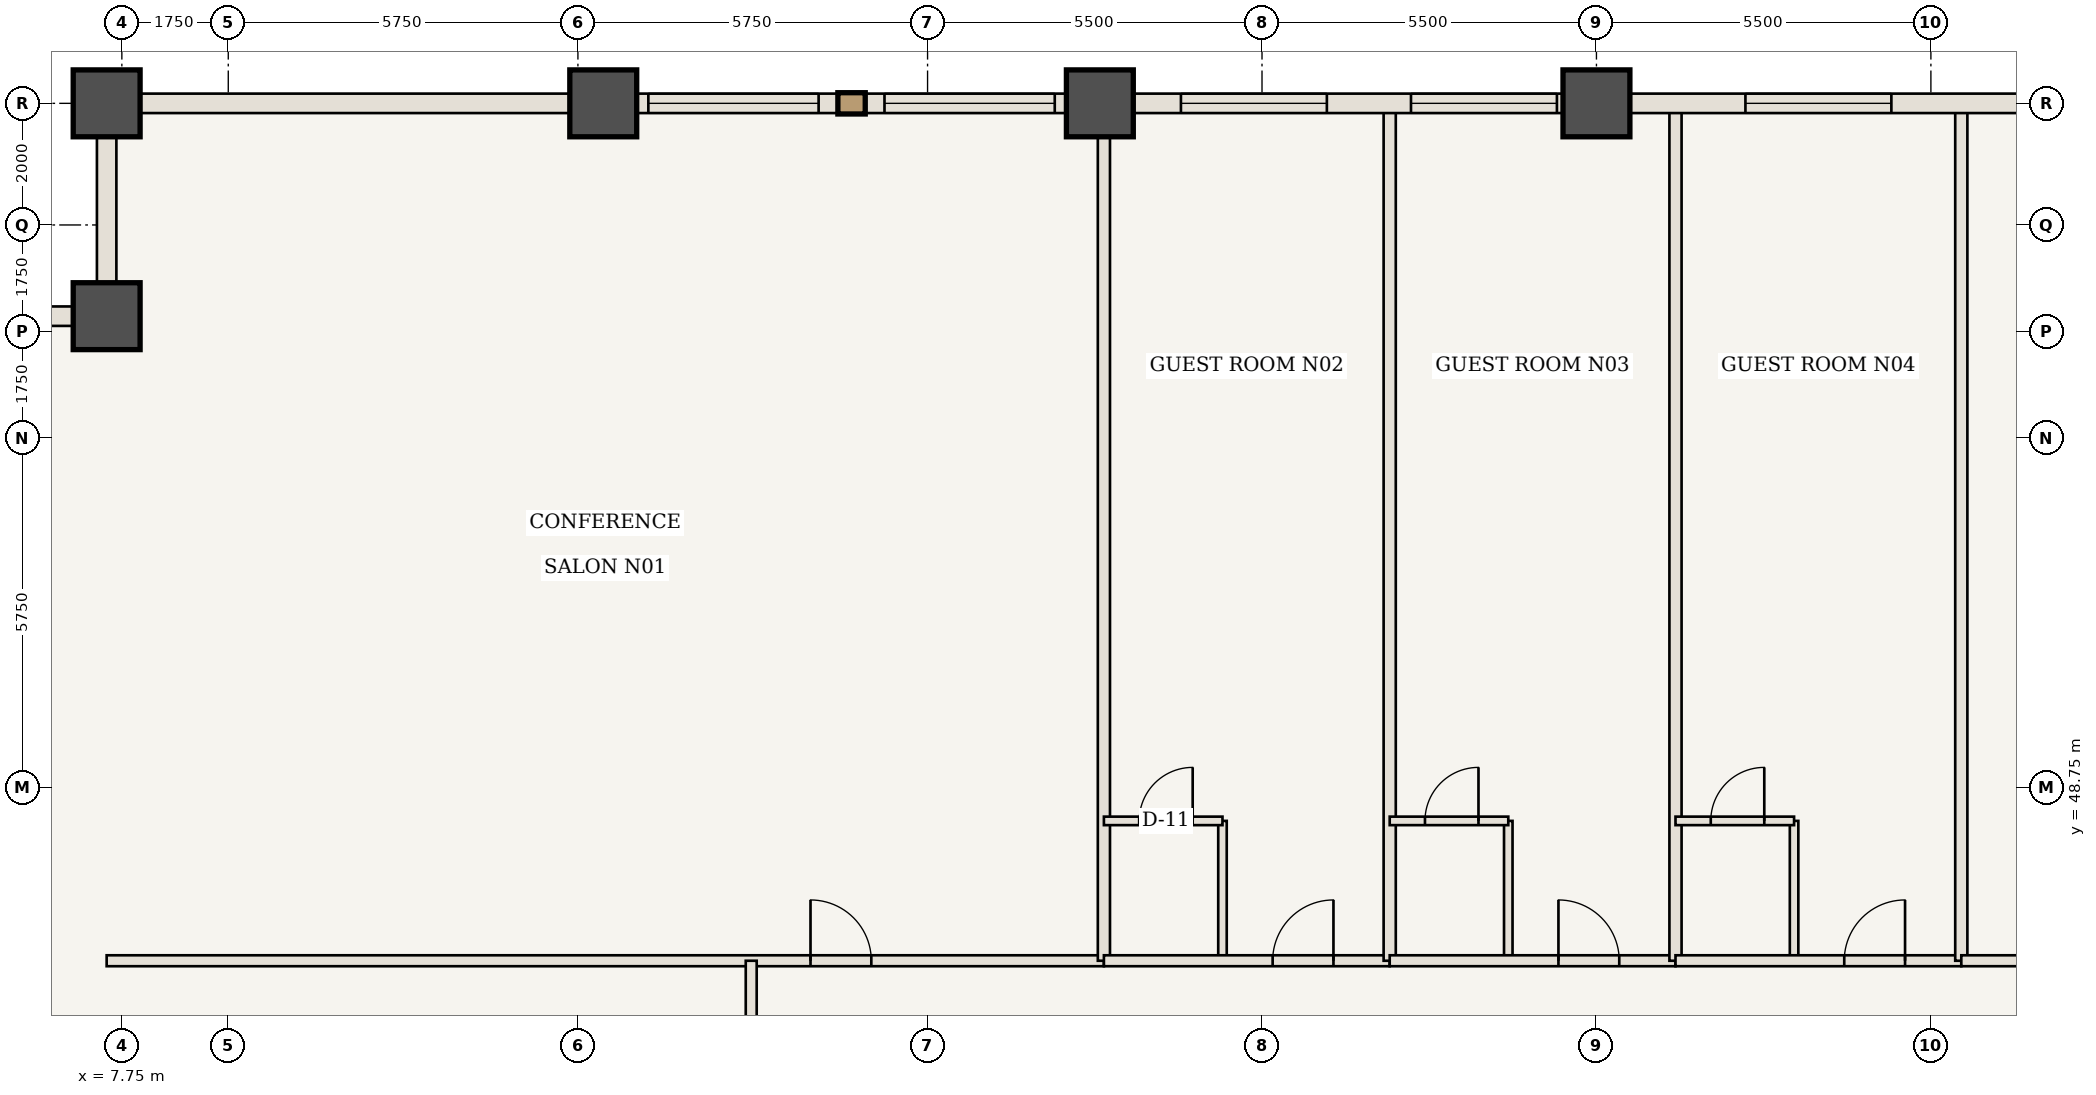
"""IFC4 building model, lengths in metres.
Left out: names, types, materials, properties, quantities, classifications, styles, units other than length and angle.
Written with IfcOpenShell. Run it as: python <this file> out.ifc"""

import sys

from ifc_helpers import new_model, si_unit, direction, frame, frame_2d, origin, origin_2d, place, context, subcontext, project, spatial, rectangle, extrude, element, fill, save


model = new_model("IFC4")
c1 = context("Model", 3, precision=1e-05, world=origin(), true_north=direction((0.0, 1.0)))
c2 = subcontext(c1, "Body", "Model", "MODEL_VIEW")
j1 = project(units=[si_unit("LENGTHUNIT", "METRE"), si_unit("PLANEANGLEUNIT", "RADIAN")], contexts=[c1])
p1 = place(None, origin())
s1 = spatial("IfcSite", under=j1, at=p1, CompositionType="ELEMENT")
p2 = place(p1, origin())
s2 = spatial("IfcBuilding", under=s1, at=p2, CompositionType="ELEMENT")
p3 = place(p2, frame((0.0, 0.0, 52.85)))
s3 = spatial("IfcBuildingStorey", under=s2, at=p3, CompositionType="ELEMENT", Elevation=52.85)
for number, where, z_axis, x_axis in (
    (1, (7.5, 60.0, 0.0), (0.0, 0.0, 1.0), (1.0, 0.0, 0.0)),
    (2, (7.5, 56.5, 0.0), (0.0, 0.0, 1.0), (1.0, 0.0, 0.0)),
    (3, (15.667, 60.0, 0.0), (0.0, 0.0, 1.0), (1.0, 0.0, 0.0)),
    (4, (23.833, 60.0, 0.0), (0.0, 0.0, 1.0), (1.0, 0.0, 0.0)),
    (5, (32.0, 60.0, 0.0), (0.0, 0.0, 1.0), (1.0, 0.0, 0.0)),
):
    element("IfcColumn", number, at=place(p3, frame(where, z_axis=z_axis, x_axis=x_axis)), inside=s3, PredefinedType="COLUMN", context=c2, shape_type="SweptSolid", body=[
        extrude(rectangle(XDim=1.1, YDim=1.1, at=origin_2d()), origin(), (0.0, 0.0, 1.0), 3.5),
    ])
p4 = place(p3, frame((7.5, 45.9, 0.0), z_axis=(0.0, 0.0, 1.0), x_axis=(1.0, 0.0, 0.0)))
e6 = element("IfcWall", 6, at=p4, inside=s3, PredefinedType="STANDARD", context=c2, shape_type="SweptSolid", body=[
    extrude(rectangle(XDim=16.4, YDim=0.18, at=frame_2d((8.2, 0.0))), origin(), (0.0, 0.0, 1.0), 3.32),
])
p5 = place(p4, frame((11.575, 0.0, 0.0)))
e7 = element("IfcOpeningElement", 7, at=p5, cuts=e6, PredefinedType="OPENING", context=c2, shape_type="SweptSolid", body=[
    extrude(rectangle(XDim=1.0, YDim=2.15, at=frame_2d((0.5, 1.075))), frame((0.0, 0.1, 0.0), z_axis=(0.0, -1.0, 0.0), x_axis=(1.0, 0.0, 0.0)), (0.0, 0.0, 1.0), 0.2),
])
p6 = place(p3, frame((23.9, 45.9, 0.0), z_axis=(0.0, 0.0, 1.0), x_axis=(0.0, 1.0, 0.0)))
e8 = element("IfcWall", 8, at=p6, inside=s3, PredefinedType="STANDARD", context=c2, shape_type="SweptSolid", body=[
    extrude(rectangle(XDim=14.04, YDim=0.2, at=frame_2d((7.02, 0.0))), origin(), (0.0, 0.0, 1.0), 3.32),
])
p7 = place(p3, frame((25.85, 45.9, 0.0), z_axis=(0.0, 0.0, 1.0), x_axis=(0.0, 1.0, 0.0)))
e9 = element("IfcWall", 9, at=p7, inside=s3, PredefinedType="STANDARD", context=c2, shape_type="SweptSolid", body=[
    extrude(rectangle(XDim=2.3, YDim=0.14, at=frame_2d((1.15, 0.0))), origin(), (0.0, 0.0, 1.0), 3.32),
])
p8 = place(p3, frame((23.9, 48.2, 0.0), z_axis=(0.0, 0.0, 1.0), x_axis=(1.0, 0.0, 0.0)))
e10 = element("IfcWall", 10, at=p8, inside=s3, PredefinedType="STANDARD", context=c2, shape_type="SweptSolid", body=[
    extrude(rectangle(XDim=1.95, YDim=0.14, at=frame_2d((0.975, 0.0))), origin(), (0.0, 0.0, 1.0), 3.32),
])
p9 = place(p8, frame((0.58, 0.0, 0.0)))
e11 = element("IfcOpeningElement", 11, at=p9, cuts=e10, PredefinedType="OPENING", context=c2, shape_type="SweptSolid", body=[
    extrude(rectangle(XDim=0.88, YDim=2.1, at=frame_2d((0.44, 1.05))), frame((0.0, 0.08, 0.0), z_axis=(0.0, -1.0, 0.0), x_axis=(1.0, 0.0, 0.0)), (0.0, 0.0, 1.0), 0.16),
])
p10 = place(p3, frame((23.9, 45.9, 0.0), z_axis=(0.0, 0.0, 1.0), x_axis=(1.0, 0.0, 0.0)))
e12 = element("IfcWall", 12, at=p10, inside=s3, PredefinedType="STANDARD", context=c2, shape_type="SweptSolid", body=[
    extrude(rectangle(XDim=4.7, YDim=0.18, at=frame_2d((2.35, 0.0))), origin(), (0.0, 0.0, 1.0), 3.32),
])
p11 = place(p10, frame((2.775, 0.0, 0.0)))
e13 = element("IfcOpeningElement", 13, at=p11, cuts=e12, PredefinedType="OPENING", context=c2, shape_type="SweptSolid", body=[
    extrude(rectangle(XDim=1.0, YDim=2.15, at=frame_2d((0.5, 1.075))), frame((0.0, 0.1, 0.0), z_axis=(0.0, -1.0, 0.0), x_axis=(1.0, 0.0, 0.0)), (0.0, 0.0, 1.0), 0.2),
])
p12 = place(p3, frame((28.6, 45.9, 0.0), z_axis=(0.0, 0.0, 1.0), x_axis=(0.0, 1.0, 0.0)))
e14 = element("IfcWall", 14, at=p12, inside=s3, PredefinedType="STANDARD", context=c2, shape_type="SweptSolid", body=[
    extrude(rectangle(XDim=14.04, YDim=0.2, at=frame_2d((7.02, 0.0))), origin(), (0.0, 0.0, 1.0), 3.32),
])
p13 = place(p3, frame((30.55, 45.9, 0.0), z_axis=(0.0, 0.0, 1.0), x_axis=(0.0, 1.0, 0.0)))
e15 = element("IfcWall", 15, at=p13, inside=s3, PredefinedType="STANDARD", context=c2, shape_type="SweptSolid", body=[
    extrude(rectangle(XDim=2.3, YDim=0.14, at=frame_2d((1.15, 0.0))), origin(), (0.0, 0.0, 1.0), 3.32),
])
p14 = place(p3, frame((28.6, 48.2, 0.0), z_axis=(0.0, 0.0, 1.0), x_axis=(1.0, 0.0, 0.0)))
e16 = element("IfcWall", 16, at=p14, inside=s3, PredefinedType="STANDARD", context=c2, shape_type="SweptSolid", body=[
    extrude(rectangle(XDim=1.95, YDim=0.14, at=frame_2d((0.975, 0.0))), origin(), (0.0, 0.0, 1.0), 3.32),
])
p15 = place(p14, frame((0.58, 0.0, 0.0)))
e17 = element("IfcOpeningElement", 17, at=p15, cuts=e16, PredefinedType="OPENING", context=c2, shape_type="SweptSolid", body=[
    extrude(rectangle(XDim=0.88, YDim=2.1, at=frame_2d((0.44, 1.05))), frame((0.0, 0.08, 0.0), z_axis=(0.0, -1.0, 0.0), x_axis=(1.0, 0.0, 0.0)), (0.0, 0.0, 1.0), 0.16),
])
p16 = place(p3, frame((28.6, 45.9, 0.0), z_axis=(0.0, 0.0, 1.0), x_axis=(1.0, 0.0, 0.0)))
e18 = element("IfcWall", 18, at=p16, inside=s3, PredefinedType="STANDARD", context=c2, shape_type="SweptSolid", body=[
    extrude(rectangle(XDim=4.7, YDim=0.18, at=frame_2d((2.35, 0.0))), origin(), (0.0, 0.0, 1.0), 3.32),
])
p17 = place(p16, frame((2.775, 0.0, 0.0)))
e19 = element("IfcOpeningElement", 19, at=p17, cuts=e18, PredefinedType="OPENING", context=c2, shape_type="SweptSolid", body=[
    extrude(rectangle(XDim=1.0, YDim=2.15, at=frame_2d((0.5, 1.075))), frame((0.0, 0.1, 0.0), z_axis=(0.0, -1.0, 0.0), x_axis=(1.0, 0.0, 0.0)), (0.0, 0.0, 1.0), 0.2),
])
p18 = place(p3, frame((33.3, 45.9, 0.0), z_axis=(0.0, 0.0, 1.0), x_axis=(0.0, 1.0, 0.0)))
e20 = element("IfcWall", 20, at=p18, inside=s3, PredefinedType="STANDARD", context=c2, shape_type="SweptSolid", body=[
    extrude(rectangle(XDim=14.04, YDim=0.2, at=frame_2d((7.02, 0.0))), origin(), (0.0, 0.0, 1.0), 3.32),
])
p19 = place(p3, frame((35.25, 45.9, 0.0), z_axis=(0.0, 0.0, 1.0), x_axis=(0.0, 1.0, 0.0)))
e21 = element("IfcWall", 21, at=p19, inside=s3, PredefinedType="STANDARD", context=c2, shape_type="SweptSolid", body=[
    extrude(rectangle(XDim=2.3, YDim=0.14, at=frame_2d((1.15, 0.0))), origin(), (0.0, 0.0, 1.0), 3.32),
])
p20 = place(p3, frame((33.3, 48.2, 0.0), z_axis=(0.0, 0.0, 1.0), x_axis=(1.0, 0.0, 0.0)))
e22 = element("IfcWall", 22, at=p20, inside=s3, PredefinedType="STANDARD", context=c2, shape_type="SweptSolid", body=[
    extrude(rectangle(XDim=1.95, YDim=0.14, at=frame_2d((0.975, 0.0))), origin(), (0.0, 0.0, 1.0), 3.32),
])
p21 = place(p20, frame((0.58, 0.0, 0.0)))
e23 = element("IfcOpeningElement", 23, at=p21, cuts=e22, PredefinedType="OPENING", context=c2, shape_type="SweptSolid", body=[
    extrude(rectangle(XDim=0.88, YDim=2.1, at=frame_2d((0.44, 1.05))), frame((0.0, 0.08, 0.0), z_axis=(0.0, -1.0, 0.0), x_axis=(1.0, 0.0, 0.0)), (0.0, 0.0, 1.0), 0.16),
])
p22 = place(p3, frame((33.3, 45.9, 0.0), z_axis=(0.0, 0.0, 1.0), x_axis=(1.0, 0.0, 0.0)))
e24 = element("IfcWall", 24, at=p22, inside=s3, PredefinedType="STANDARD", context=c2, shape_type="SweptSolid", body=[
    extrude(rectangle(XDim=4.7, YDim=0.18, at=frame_2d((2.35, 0.0))), origin(), (0.0, 0.0, 1.0), 3.32),
])
p23 = place(p22, frame((2.775, 0.0, 0.0)))
e25 = element("IfcOpeningElement", 25, at=p23, cuts=e24, PredefinedType="OPENING", context=c2, shape_type="SweptSolid", body=[
    extrude(rectangle(XDim=1.0, YDim=2.15, at=frame_2d((0.5, 1.075))), frame((0.0, 0.1, 0.0), z_axis=(0.0, -1.0, 0.0), x_axis=(1.0, 0.0, 0.0)), (0.0, 0.0, 1.0), 0.2),
])
p24 = place(p3, frame((38.0, 45.9, 0.0), z_axis=(0.0, 0.0, 1.0), x_axis=(0.0, 1.0, 0.0)))
e26 = element("IfcWall", 26, at=p24, inside=s3, PredefinedType="STANDARD", context=c2, shape_type="SweptSolid", body=[
    extrude(rectangle(XDim=14.04, YDim=0.2, at=frame_2d((7.02, 0.0))), origin(), (0.0, 0.0, 1.0), 3.32),
])
p25 = place(p3, frame((38.0, 45.9, 0.0), z_axis=(0.0, 0.0, 1.0), x_axis=(1.0, 0.0, 0.0)))
e27 = element("IfcWall", 27, at=p25, inside=s3, PredefinedType="STANDARD", context=c2, shape_type="SweptSolid", body=[
    extrude(rectangle(XDim=18.5, YDim=0.18, at=frame_2d((9.25, 0.0))), origin(), (0.0, 0.0, 1.0), 3.32),
])
p26 = place(p25, frame((4.875, 0.0, 0.0)))
e28 = element("IfcOpeningElement", 28, at=p26, cuts=e27, PredefinedType="OPENING", context=c2, shape_type="SweptSolid", body=[
    extrude(rectangle(XDim=1.0, YDim=2.15, at=frame_2d((0.5, 1.075))), frame((0.0, 0.1, 0.0), z_axis=(0.0, -1.0, 0.0), x_axis=(1.0, 0.0, 0.0)), (0.0, 0.0, 1.0), 0.2),
])
p27 = place(p3, frame((18.1, 38.5, 0.0), z_axis=(0.0, 0.0, 1.0), x_axis=(0.0, 1.0, 0.0)))
e29 = element("IfcWall", 29, at=p27, inside=s3, PredefinedType="STANDARD", context=c2, shape_type="SweptSolid", body=[
    extrude(rectangle(XDim=7.4, YDim=0.18, at=frame_2d((3.7, 0.0))), origin(), (0.0, 0.0, 1.0), 3.32),
])
p28 = place(p27, frame((4.65, 0.0, 0.0)))
e30 = element("IfcOpeningElement", 30, at=p28, cuts=e29, PredefinedType="OPENING", context=c2, shape_type="SweptSolid", body=[
    extrude(rectangle(XDim=1.0, YDim=2.15, at=frame_2d((0.5, 1.075))), frame((0.0, 0.1, 0.0), z_axis=(0.0, -1.0, 0.0), x_axis=(1.0, 0.0, 0.0)), (0.0, 0.0, 1.0), 0.2),
])
p29 = place(p3, frame((7.5, 60.0, 0.0), z_axis=(0.0, 0.0, 1.0), x_axis=(1.0, 0.0, 0.0)))
e31 = element("IfcWall", 31, at=p29, inside=s3, PredefinedType="USERDEFINED", context=c2, shape_type="SweptSolid", body=[
    extrude(rectangle(XDim=8.167, YDim=0.32, at=frame_2d((4.083, 0.0))), origin(), (0.0, 0.0, 1.0), 2.52),
])
p30 = place(p3, frame((15.667, 60.0, 0.0), z_axis=(0.0, 0.0, 1.0), x_axis=(1.0, 0.0, 0.0)))
e32 = element("IfcWall", 32, at=p30, inside=s3, PredefinedType="USERDEFINED", context=c2, shape_type="SweptSolid", body=[
    extrude(rectangle(XDim=8.167, YDim=0.32, at=frame_2d((4.083, 0.0))), origin(), (0.0, 0.0, 1.0), 2.52),
])
p31 = place(p30, frame((0.742, 0.0, 0.85)))
e33 = element("IfcOpeningElement", 33, at=p31, cuts=e32, PredefinedType="OPENING", context=c2, shape_type="SweptSolid", body=[
    extrude(rectangle(XDim=2.8, YDim=1.47, at=frame_2d((1.4, 0.735))), frame((0.0, 0.17, 0.0), z_axis=(0.0, -1.0, 0.0), x_axis=(1.0, 0.0, 0.0)), (0.0, 0.0, 1.0), 0.34),
])
p32 = place(p30, frame((4.625, 0.0, 0.85)))
e34 = element("IfcOpeningElement", 34, at=p32, cuts=e32, PredefinedType="OPENING", context=c2, shape_type="SweptSolid", body=[
    extrude(rectangle(XDim=2.8, YDim=1.47, at=frame_2d((1.4, 0.735))), frame((0.0, 0.17, 0.0), z_axis=(0.0, -1.0, 0.0), x_axis=(1.0, 0.0, 0.0)), (0.0, 0.0, 1.0), 0.34),
])
p33 = place(p3, frame((23.833, 60.0, 0.0), z_axis=(0.0, 0.0, 1.0), x_axis=(1.0, 0.0, 0.0)))
e35 = element("IfcWall", 35, at=p33, inside=s3, PredefinedType="USERDEFINED", context=c2, shape_type="SweptSolid", body=[
    extrude(rectangle(XDim=8.167, YDim=0.32, at=frame_2d((4.083, 0.0))), origin(), (0.0, 0.0, 1.0), 2.52),
])
p34 = place(p33, frame((1.333, 0.0, 0.85)))
e36 = element("IfcOpeningElement", 36, at=p34, cuts=e35, PredefinedType="OPENING", context=c2, shape_type="SweptSolid", body=[
    extrude(rectangle(XDim=2.4, YDim=1.47, at=frame_2d((1.2, 0.735))), frame((0.0, 0.17, 0.0), z_axis=(0.0, -1.0, 0.0), x_axis=(1.0, 0.0, 0.0)), (0.0, 0.0, 1.0), 0.34),
])
p35 = place(p33, frame((5.117, 0.0, 0.85)))
e37 = element("IfcOpeningElement", 37, at=p35, cuts=e35, PredefinedType="OPENING", context=c2, shape_type="SweptSolid", body=[
    extrude(rectangle(XDim=2.4, YDim=1.47, at=frame_2d((1.2, 0.735))), frame((0.0, 0.17, 0.0), z_axis=(0.0, -1.0, 0.0), x_axis=(1.0, 0.0, 0.0)), (0.0, 0.0, 1.0), 0.34),
])
p36 = place(p3, frame((32.0, 60.0, 0.0), z_axis=(0.0, 0.0, 1.0), x_axis=(1.0, 0.0, 0.0)))
e38 = element("IfcWall", 38, at=p36, inside=s3, PredefinedType="USERDEFINED", context=c2, shape_type="SweptSolid", body=[
    extrude(rectangle(XDim=8.167, YDim=0.32, at=frame_2d((4.083, 0.0))), origin(), (0.0, 0.0, 1.0), 2.52),
])
p37 = place(p36, frame((2.45, 0.0, 0.85)))
e39 = element("IfcOpeningElement", 39, at=p37, cuts=e38, PredefinedType="OPENING", context=c2, shape_type="SweptSolid", body=[
    extrude(rectangle(XDim=2.4, YDim=1.47, at=frame_2d((1.2, 0.735))), frame((0.0, 0.17, 0.0), z_axis=(0.0, -1.0, 0.0), x_axis=(1.0, 0.0, 0.0)), (0.0, 0.0, 1.0), 0.34),
])
for number, where, z_axis, x_axis in (
    (40, (7.5, 56.5, 0.0), (0.0, 0.0, 1.0), (0.0, 1.0, 0.0)),
    (41, (4.0, 56.5, 0.0), (0.0, 0.0, 1.0), (1.0, 0.0, 0.0)),
):
    element("IfcWall", number, at=place(p3, frame(where, z_axis=z_axis, x_axis=x_axis)), inside=s3, PredefinedType="USERDEFINED", context=c2, shape_type="SweptSolid", body=[
        extrude(rectangle(XDim=3.5, YDim=0.32, at=frame_2d((1.75, 0.0))), origin(), (0.0, 0.0, 1.0), 2.52),
    ])
p38 = place(p5, origin())
e42 = element("IfcDoor", 42, at=p38, inside=s3, OperationType="SINGLE_SWING_LEFT", PredefinedType="DOOR", context=c2, shape_type="SweptSolid", body=[
    extrude(rectangle(XDim=1.0, YDim=2.15, at=frame_2d((0.5, 1.075))), frame((0.0, 0.025, 0.0), z_axis=(0.0, -1.0, 0.0), x_axis=(1.0, 0.0, 0.0)), (0.0, 0.0, 1.0), 0.05),
])
fill(e7, e42)
p39 = place(p9, origin())
e43 = element("IfcDoor", 43, at=p39, inside=s3, OperationType="SINGLE_SWING_RIGHT", PredefinedType="DOOR", context=c2, shape_type="SweptSolid", body=[
    extrude(rectangle(XDim=0.88, YDim=2.1, at=frame_2d((0.44, 1.05))), frame((0.0, 0.025, 0.0), z_axis=(0.0, -1.0, 0.0), x_axis=(1.0, 0.0, 0.0)), (0.0, 0.0, 1.0), 0.05),
])
fill(e11, e43)
p40 = place(p11, origin())
e44 = element("IfcDoor", 44, at=p40, inside=s3, OperationType="SINGLE_SWING_RIGHT", PredefinedType="DOOR", context=c2, shape_type="SweptSolid", body=[
    extrude(rectangle(XDim=1.0, YDim=2.15, at=frame_2d((0.5, 1.075))), frame((0.0, 0.025, 0.0), z_axis=(0.0, -1.0, 0.0), x_axis=(1.0, 0.0, 0.0)), (0.0, 0.0, 1.0), 0.05),
])
fill(e13, e44)
p41 = place(p15, origin())
e45 = element("IfcDoor", 45, at=p41, inside=s3, OperationType="SINGLE_SWING_RIGHT", PredefinedType="DOOR", context=c2, shape_type="SweptSolid", body=[
    extrude(rectangle(XDim=0.88, YDim=2.1, at=frame_2d((0.44, 1.05))), frame((0.0, 0.025, 0.0), z_axis=(0.0, -1.0, 0.0), x_axis=(1.0, 0.0, 0.0)), (0.0, 0.0, 1.0), 0.05),
])
fill(e17, e45)
p42 = place(p17, origin())
e46 = element("IfcDoor", 46, at=p42, inside=s3, OperationType="SINGLE_SWING_LEFT", PredefinedType="DOOR", context=c2, shape_type="SweptSolid", body=[
    extrude(rectangle(XDim=1.0, YDim=2.15, at=frame_2d((0.5, 1.075))), frame((0.0, 0.025, 0.0), z_axis=(0.0, -1.0, 0.0), x_axis=(1.0, 0.0, 0.0)), (0.0, 0.0, 1.0), 0.05),
])
fill(e19, e46)
p43 = place(p21, origin())
e47 = element("IfcDoor", 47, at=p43, inside=s3, OperationType="SINGLE_SWING_RIGHT", PredefinedType="DOOR", context=c2, shape_type="SweptSolid", body=[
    extrude(rectangle(XDim=0.88, YDim=2.1, at=frame_2d((0.44, 1.05))), frame((0.0, 0.025, 0.0), z_axis=(0.0, -1.0, 0.0), x_axis=(1.0, 0.0, 0.0)), (0.0, 0.0, 1.0), 0.05),
])
fill(e23, e47)
p44 = place(p23, origin())
e48 = element("IfcDoor", 48, at=p44, inside=s3, OperationType="SINGLE_SWING_RIGHT", PredefinedType="DOOR", context=c2, shape_type="SweptSolid", body=[
    extrude(rectangle(XDim=1.0, YDim=2.15, at=frame_2d((0.5, 1.075))), frame((0.0, 0.025, 0.0), z_axis=(0.0, -1.0, 0.0), x_axis=(1.0, 0.0, 0.0)), (0.0, 0.0, 1.0), 0.05),
])
fill(e25, e48)
p45 = place(p31, origin())
e49 = element("IfcWindow", 49, at=p45, inside=s3, PartitioningType="SINGLE_PANEL", PredefinedType="WINDOW", context=c2, shape_type="SweptSolid", body=[
    extrude(rectangle(XDim=2.8, YDim=1.47, at=frame_2d((1.4, 0.735))), frame((0.0, 0.03, 0.0), z_axis=(0.0, -1.0, 0.0), x_axis=(1.0, 0.0, 0.0)), (0.0, 0.0, 1.0), 0.06),
])
fill(e33, e49)
p46 = place(p32, origin())
e50 = element("IfcWindow", 50, at=p46, inside=s3, PartitioningType="SINGLE_PANEL", PredefinedType="WINDOW", context=c2, shape_type="SweptSolid", body=[
    extrude(rectangle(XDim=2.8, YDim=1.47, at=frame_2d((1.4, 0.735))), frame((0.0, 0.03, 0.0), z_axis=(0.0, -1.0, 0.0), x_axis=(1.0, 0.0, 0.0)), (0.0, 0.0, 1.0), 0.06),
])
fill(e34, e50)
p47 = place(p34, origin())
e51 = element("IfcWindow", 51, at=p47, inside=s3, PartitioningType="SINGLE_PANEL", PredefinedType="WINDOW", context=c2, shape_type="SweptSolid", body=[
    extrude(rectangle(XDim=2.4, YDim=1.47, at=frame_2d((1.2, 0.735))), frame((0.0, 0.03, 0.0), z_axis=(0.0, -1.0, 0.0), x_axis=(1.0, 0.0, 0.0)), (0.0, 0.0, 1.0), 0.06),
])
fill(e36, e51)
p48 = place(p35, origin())
e52 = element("IfcWindow", 52, at=p48, inside=s3, PartitioningType="SINGLE_PANEL", PredefinedType="WINDOW", context=c2, shape_type="SweptSolid", body=[
    extrude(rectangle(XDim=2.4, YDim=1.47, at=frame_2d((1.2, 0.735))), frame((0.0, 0.03, 0.0), z_axis=(0.0, -1.0, 0.0), x_axis=(1.0, 0.0, 0.0)), (0.0, 0.0, 1.0), 0.06),
])
fill(e37, e52)
p49 = place(p37, origin())
e53 = element("IfcWindow", 53, at=p49, inside=s3, PartitioningType="SINGLE_PANEL", PredefinedType="WINDOW", context=c2, shape_type="SweptSolid", body=[
    extrude(rectangle(XDim=2.4, YDim=1.47, at=frame_2d((1.2, 0.735))), frame((0.0, 0.03, 0.0), z_axis=(0.0, -1.0, 0.0), x_axis=(1.0, 0.0, 0.0)), (0.0, 0.0, 1.0), 0.06),
])
fill(e39, e53)
save(model, sys.argv[1])
